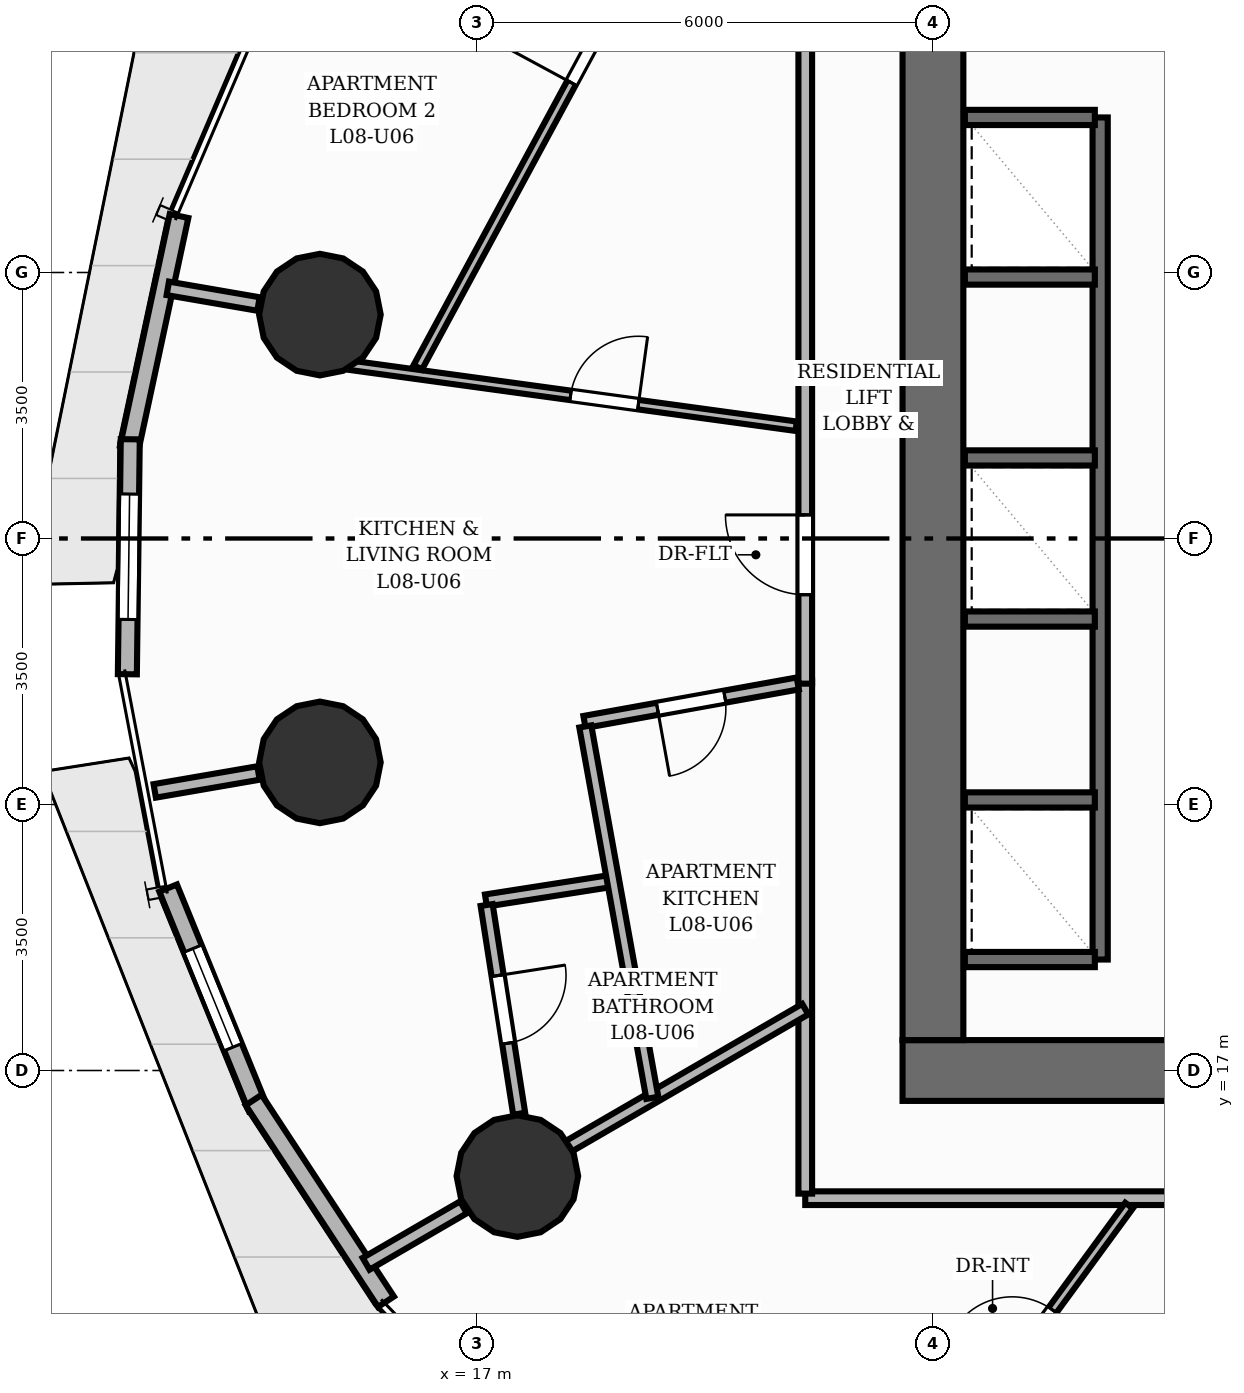
"""IFC4 building model, lengths in metres.
Left out: names, types, materials, properties, quantities, classifications, styles, units other than length and angle.
Written with IfcOpenShell. Run it as: python <this file> out.ifc"""

import sys

from ifc_helpers import new_model, si_unit, direction, frame, frame_2d, origin, origin_2d, place, context, subcontext, project, spatial, rectangle, circle, extrude, element, fill, save


model = new_model("IFC4")
c1 = context("Model", 3, precision=1e-05, world=origin(), true_north=direction((0.0, 1.0)))
c2 = subcontext(c1, "Body", "Model", "MODEL_VIEW")
j1 = project(units=[si_unit("LENGTHUNIT", "METRE"), si_unit("PLANEANGLEUNIT", "RADIAN")], contexts=[c1])
p1 = place(None, origin())
s1 = spatial("IfcSite", under=j1, at=p1, CompositionType="ELEMENT")
p2 = place(p1, origin())
s2 = spatial("IfcBuilding", under=s1, at=p2, CompositionType="ELEMENT")
p3 = place(p2, frame((0.0, 0.0, 31.2)))
s3 = spatial("IfcBuildingStorey", under=s2, at=p3, CompositionType="ELEMENT", Elevation=31.2)
p4 = place(p3, frame((22.6, 17.0, 0.0), z_axis=(0.0, 0.0, 1.0), x_axis=(1.0, 0.0, 0.0)))
e1 = element("IfcWall", 1, at=p4, inside=s3, PredefinedType="SHEAR", context=c2, shape_type="SweptSolid", body=[
    extrude(rectangle(XDim=18.8, YDim=0.8, at=frame_2d((9.4, 0.0))), origin(), (0.0, 0.0, 1.0), 3.2),
])
p5 = place(p4, frame((5.9, 0.0, 0.0)))
e2 = element("IfcOpeningElement", 2, at=p5, cuts=e1, PredefinedType="OPENING", context=c2, shape_type="SweptSolid", body=[
    extrude(rectangle(XDim=1.1, YDim=2.15, at=frame_2d((0.55, 1.075))), frame((0.0, 0.41, 0.0), z_axis=(0.0, -1.0, 0.0), x_axis=(1.0, 0.0, 0.0)), (0.0, 0.0, 1.0), 0.82),
])
p6 = place(p4, frame((9.45, 0.0, 0.0)))
e3 = element("IfcOpeningElement", 3, at=p6, cuts=e1, PredefinedType="OPENING", context=c2, shape_type="SweptSolid", body=[
    extrude(rectangle(XDim=0.9, YDim=2.1, at=frame_2d((0.45, 1.05))), frame((0.0, 0.41, 0.0), z_axis=(0.0, -1.0, 0.0), x_axis=(1.0, 0.0, 0.0)), (0.0, 0.0, 1.0), 0.82),
])
p7 = place(p3, frame((23.0, 17.4, 0.0), z_axis=(0.0, 0.0, 1.0), x_axis=(0.0, 1.0, 0.0)))
e4 = element("IfcWall", 4, at=p7, inside=s3, PredefinedType="SHEAR", context=c2, shape_type="SweptSolid", body=[
    extrude(rectangle(XDim=13.2, YDim=0.8, at=frame_2d((6.6, 0.0))), origin(), (0.0, 0.0, 1.0), 3.2),
])
for number, where, z_axis, x_axis in (
    (5, (14.934, 26.946, 0.0), (0.0, 0.0, 1.0), (1.0, 0.0, 0.0)),
    (6, (14.934, 21.054, 0.0), (0.0, 0.0, 1.0), (1.0, 0.0, 0.0)),
    (7, (17.532, 15.611, 0.0), (0.0, 0.0, 1.0), (1.0, 0.0, 0.0)),
):
    element("IfcColumn", number, at=place(p3, frame(where, z_axis=z_axis, x_axis=x_axis)), inside=s3, PredefinedType="COLUMN", context=c2, shape_type="SweptSolid", body=[
        extrude(circle(Radius=0.8, at=origin_2d()), origin(), (0.0, 0.0, 1.0), 3.2),
    ])
p8 = place(p3, frame((12.427, 25.192, 0.0), z_axis=(0.0, 0.0, 1.0), x_axis=(0.209668000253, 0.977772637002, 0.0)))
e8 = element("IfcWall", 8, at=p8, inside=s3, PredefinedType="SOLIDWALL", context=c2, shape_type="SweptSolid", body=[
    extrude(rectangle(XDim=3.121, YDim=0.25, at=frame_2d((1.56, 0.0))), origin(), (0.0, 0.0, 1.0), 2.96),
])
p9 = place(p3, frame((12.401, 22.214, 0.0), z_axis=(0.0, 0.0, 1.0), x_axis=(0.012397373015, 0.999923149618, 0.0)))
e9 = element("IfcWall", 9, at=p9, inside=s3, PredefinedType="SOLIDWALL", context=c2, shape_type="SweptSolid", body=[
    extrude(rectangle(XDim=3.092, YDim=0.25, at=frame_2d((1.546, 0.0))), origin(), (0.0, 0.0, 1.0), 2.96),
])
p10 = place(p9, frame((0.721, 0.0, 0.85)))
e10 = element("IfcOpeningElement", 10, at=p10, cuts=e9, PredefinedType="OPENING", context=c2, shape_type="SweptSolid", body=[
    extrude(rectangle(XDim=1.65, YDim=1.55, at=frame_2d((0.825, 0.775))), frame((0.0, 0.135, 0.0), z_axis=(0.0, -1.0, 0.0), x_axis=(1.0, 0.0, 0.0)), (0.0, 0.0, 1.0), 0.27),
])
p11 = place(p3, frame((14.115, 16.511, 0.0), z_axis=(0.0, 0.0, 1.0), x_axis=(-0.377493207518, 0.926012353199, 0.0)))
e11 = element("IfcWall", 11, at=p11, inside=s3, PredefinedType="SOLIDWALL", context=c2, shape_type="SweptSolid", body=[
    extrude(rectangle(XDim=3.121, YDim=0.25, at=frame_2d((1.56, 0.0))), origin(), (0.0, 0.0, 1.0), 2.96),
])
p12 = place(p11, frame((0.86, 0.0, 0.85)))
e12 = element("IfcOpeningElement", 12, at=p12, cuts=e11, PredefinedType="OPENING", context=c2, shape_type="SweptSolid", body=[
    extrude(rectangle(XDim=1.4, YDim=1.55, at=frame_2d((0.7, 0.775))), frame((0.0, 0.135, 0.0), z_axis=(0.0, -1.0, 0.0), x_axis=(1.0, 0.0, 0.0)), (0.0, 0.0, 1.0), 0.27),
])
p13 = place(p3, frame((15.804, 13.958, 0.0), z_axis=(0.0, 0.0, 1.0), x_axis=(-0.548579153619, 0.836098625889, 0.0)))
e13 = element("IfcWall", 13, at=p13, inside=s3, PredefinedType="SOLIDWALL", context=c2, shape_type="SweptSolid", body=[
    extrude(rectangle(XDim=3.174, YDim=0.25, at=frame_2d((1.587, 0.0))), origin(), (0.0, 0.0, 1.0), 2.96),
])
p14 = place(p3, frame((25.2, 18.46, 0.0), z_axis=(0.0, 0.0, 1.0), x_axis=(0.0, 1.0, 0.0)))
e14 = element("IfcWall", 14, at=p14, inside=s3, PredefinedType="SHEAR", context=c2, shape_type="SweptSolid", body=[
    extrude(rectangle(XDim=11.08, YDim=0.2, at=frame_2d((5.54, 0.0))), origin(), (0.0, 0.0, 1.0), 3.2),
])
for number, where, z_axis, x_axis in (
    (15, (23.42, 18.46, 0.0), (0.0, 0.0, 1.0), (1.0, 0.0, 0.0)),
    (16, (23.42, 29.54, 0.0), (0.0, 0.0, 1.0), (1.0, 0.0, 0.0)),
    (17, (23.42, 20.56, 0.0), (0.0, 0.0, 1.0), (1.0, 0.0, 0.0)),
    (18, (23.42, 22.94, 0.0), (0.0, 0.0, 1.0), (1.0, 0.0, 0.0)),
    (19, (23.42, 25.06, 0.0), (0.0, 0.0, 1.0), (1.0, 0.0, 0.0)),
    (20, (23.42, 27.44, 0.0), (0.0, 0.0, 1.0), (1.0, 0.0, 0.0)),
):
    element("IfcWall", number, at=place(p3, frame(where, z_axis=z_axis, x_axis=x_axis)), inside=s3, PredefinedType="SHEAR", context=c2, shape_type="SweptSolid", body=[
        extrude(rectangle(XDim=1.71, YDim=0.2, at=frame_2d((0.855, 0.0))), origin(), (0.0, 0.0, 1.0), 3.2),
    ])
p15 = place(p3, frame((14.126, 27.085, 0.0), z_axis=(0.0, 0.0, 1.0), x_axis=(-0.985412344637, 0.170183756676, 0.0)))
e21 = element("IfcWall", 21, at=p15, inside=s3, PredefinedType="PARTITIONING", context=c2, shape_type="SweptSolid", body=[
    extrude(rectangle(XDim=1.211, YDim=0.18, at=frame_2d((0.605, 0.0))), origin(), (0.0, 0.0, 1.0), 2.178),
])
p16 = place(p3, frame((14.126, 20.915, 0.0), z_axis=(0.0, 0.0, 1.0), x_axis=(-0.985429571056, -0.170083980696, 0.0)))
e22 = element("IfcWall", 22, at=p16, inside=s3, PredefinedType="PARTITIONING", context=c2, shape_type="SweptSolid", body=[
    extrude(rectangle(XDim=1.385, YDim=0.18, at=frame_2d((0.693, 0.0))), origin(), (0.0, 0.0, 1.0), 2.178),
])
p17 = place(p3, frame((16.823, 15.2, 0.0), z_axis=(0.0, 0.0, 1.0), x_axis=(-0.865049792178, -0.501686014408, 0.0)))
e23 = element("IfcWall", 23, at=p17, inside=s3, PredefinedType="PARTITIONING", context=c2, shape_type="SweptSolid", body=[
    extrude(rectangle(XDim=1.481, YDim=0.18, at=frame_2d((0.74, 0.0))), origin(), (0.0, 0.0, 1.0), 2.178),
])
p18 = place(p3, frame((33.898, 15.32, 0.0), z_axis=(0.0, 0.0, 1.0), x_axis=(-1.0, 0.0, 0.0)))
e24 = element("IfcWall", 24, at=p18, inside=s3, PredefinedType="PARTITIONING", context=c2, shape_type="SweptSolid", body=[
    extrude(rectangle(XDim=12.578, YDim=0.18, at=frame_2d((6.289, 0.0))), origin(), (0.0, 0.0, 1.0), 2.955),
])
p19 = place(p18, frame((5.833, 0.0, 0.0)))
e25 = element("IfcOpeningElement", 25, at=p19, cuts=e24, PredefinedType="OPENING", context=c2, shape_type="SweptSolid", body=[
    extrude(rectangle(XDim=1.05, YDim=2.15, at=frame_2d((0.525, 1.075))), frame((0.0, 0.1, 0.0), z_axis=(0.0, -1.0, 0.0), x_axis=(1.0, 0.0, 0.0)), (0.0, 0.0, 1.0), 0.2),
])
p20 = place(p3, frame((21.32, 15.38, 0.0), z_axis=(0.0, 0.0, 1.0), x_axis=(0.0, 1.0, 0.0)))
e26 = element("IfcWall", 26, at=p20, inside=s3, PredefinedType="PARTITIONING", context=c2, shape_type="SweptSolid", body=[
    extrude(rectangle(XDim=6.749, YDim=0.18, at=frame_2d((3.374, 0.0))), origin(), (0.0, 0.0, 1.0), 2.955),
])
p21 = place(p3, frame((21.32, 22.09, 0.0), z_axis=(0.0, 0.0, 1.0), x_axis=(0.0, 1.0, 0.0)))
e27 = element("IfcWall", 27, at=p21, inside=s3, PredefinedType="PARTITIONING", context=c2, shape_type="SweptSolid", body=[
    extrude(rectangle(XDim=10.59, YDim=0.18, at=frame_2d((5.295, 0.0))), origin(), (0.0, 0.0, 1.0), 2.955),
])
p22 = place(p21, frame((1.17, 0.0, 0.0)))
e28 = element("IfcOpeningElement", 28, at=p22, cuts=e27, PredefinedType="OPENING", context=c2, shape_type="SweptSolid", body=[
    extrude(rectangle(XDim=1.05, YDim=2.15, at=frame_2d((0.525, 1.075))), frame((0.0, 0.1, 0.0), z_axis=(0.0, -1.0, 0.0), x_axis=(1.0, 0.0, 0.0)), (0.0, 0.0, 1.0), 0.2),
])
p23 = place(p3, frame((29.39, 15.229, 0.0), z_axis=(0.0, 0.0, 1.0), x_axis=(-0.421930101453, -0.906628363492, 0.0)))
e29 = element("IfcWall", 29, at=p23, inside=s3, PredefinedType="PLUMBINGWALL", context=c2, shape_type="SweptSolid", body=[
    extrude(rectangle(XDim=8.312, YDim=0.16, at=frame_2d((4.156, 0.0))), origin(), (0.0, 0.0, 1.0), 2.955),
])
p24 = place(p23, frame((3.706, 0.0, 0.0)))
e30 = element("IfcOpeningElement", 30, at=p24, cuts=e29, PredefinedType="OPENING", context=c2, shape_type="SweptSolid", body=[
    extrude(rectangle(XDim=0.9, YDim=2.1, at=frame_2d((0.45, 1.05))), frame((0.0, 0.09, 0.0), z_axis=(0.0, -1.0, 0.0), x_axis=(1.0, 0.0, 0.0)), (0.0, 0.0, 1.0), 0.18),
])
p25 = place(p3, frame((23.038, 11.747, 0.0), z_axis=(0.0, 0.0, 1.0), x_axis=(0.590387510638, 0.807119933642, 0.0)))
e31 = element("IfcWall", 31, at=p25, inside=s3, PredefinedType="PARTITIONING", context=c2, shape_type="SweptSolid", body=[
    extrude(rectangle(XDim=4.306, YDim=0.125, at=frame_2d((2.153, 0.0))), origin(), (0.0, 0.0, 1.0), 2.178),
])
p26 = place(p25, frame((1.703, 0.0, 0.0)))
e32 = element("IfcOpeningElement", 32, at=p26, cuts=e31, PredefinedType="OPENING", context=c2, shape_type="SweptSolid", body=[
    extrude(rectangle(XDim=0.9, YDim=2.1, at=frame_2d((0.45, 1.05))), frame((0.0, 0.073, 0.0), z_axis=(0.0, -1.0, 0.0), x_axis=(1.0, 0.0, 0.0)), (0.0, 0.0, 1.0), 0.145),
])
p27 = place(p3, frame((18.202, 15.999, 0.0), z_axis=(0.0, 0.0, 1.0), x_axis=(0.865099964078, 0.501599493773, 0.0)))
e33 = element("IfcWall", 33, at=p27, inside=s3, PredefinedType="PLUMBINGWALL", context=c2, shape_type="SweptSolid", body=[
    extrude(rectangle(XDim=3.605, YDim=0.16, at=frame_2d((1.802, 0.0))), origin(), (0.0, 0.0, 1.0), 2.178),
])
p28 = place(p3, frame((18.792, 19.498, 0.0), z_axis=(0.0, 0.0, 1.0), x_axis=(-0.988061441457, -0.154060338524, 0.0)))
e34 = element("IfcWall", 34, at=p28, inside=s3, PredefinedType="PLUMBINGWALL", context=c2, shape_type="SweptSolid", body=[
    extrude(rectangle(XDim=1.694, YDim=0.16, at=frame_2d((0.847, 0.0))), origin(), (0.0, 0.0, 1.0), 2.955),
])
p29 = place(p3, frame((17.128, 19.177, 0.0), z_axis=(0.0, 0.0, 1.0), x_axis=(0.154135750111, -0.988049680197, 0.0)))
e35 = element("IfcWall", 35, at=p29, inside=s3, PredefinedType="PLUMBINGWALL", context=c2, shape_type="SweptSolid", body=[
    extrude(rectangle(XDim=2.78, YDim=0.16, at=frame_2d((1.39, 0.0))), origin(), (0.0, 0.0, 1.0), 2.955),
])
p30 = place(p29, frame((0.94, 0.0, 0.0)))
e36 = element("IfcOpeningElement", 36, at=p30, cuts=e35, PredefinedType="OPENING", context=c2, shape_type="SweptSolid", body=[
    extrude(rectangle(XDim=0.9, YDim=2.1, at=frame_2d((0.45, 1.05))), frame((0.0, 0.09, 0.0), z_axis=(0.0, -1.0, 0.0), x_axis=(1.0, 0.0, 0.0)), (0.0, 0.0, 1.0), 0.18),
])
p31 = place(p3, frame((15.33, 26.28, 0.0), z_axis=(0.0, 0.0, 1.0), x_axis=(0.990775681502, -0.135512172681, 0.0)))
e37 = element("IfcWall", 37, at=p31, inside=s3, PredefinedType="PARTITIONING", context=c2, shape_type="SweptSolid", body=[
    extrude(rectangle(XDim=5.926, YDim=0.125, at=frame_2d((2.963, 0.0))), origin(), (0.0, 0.0, 1.0), 2.955),
])
p32 = place(p31, frame((2.929, 0.0, 0.0)))
e38 = element("IfcOpeningElement", 38, at=p32, cuts=e37, PredefinedType="OPENING", context=c2, shape_type="SweptSolid", body=[
    extrude(rectangle(XDim=0.9, YDim=2.1, at=frame_2d((0.45, 1.05))), frame((0.0, 0.073, 0.0), z_axis=(0.0, -1.0, 0.0), x_axis=(1.0, 0.0, 0.0)), (0.0, 0.0, 1.0), 0.145),
])
p33 = place(p3, frame((21.222, 22.093, 0.0), z_axis=(0.0, 0.0, 1.0), x_axis=(-0.984110100035, -0.177559316875, 0.0)))
e39 = element("IfcWall", 39, at=p33, inside=s3, PredefinedType="PLUMBINGWALL", context=c2, shape_type="SweptSolid", body=[
    extrude(rectangle(XDim=2.852, YDim=0.16, at=frame_2d((1.426, 0.0))), origin(), (0.0, 0.0, 1.0), 2.178),
])
p34 = place(p33, frame((0.976, 0.0, 0.0)))
e40 = element("IfcOpeningElement", 40, at=p34, cuts=e39, PredefinedType="OPENING", context=c2, shape_type="SweptSolid", body=[
    extrude(rectangle(XDim=0.9, YDim=2.1, at=frame_2d((0.45, 1.05))), frame((0.0, 0.09, 0.0), z_axis=(0.0, -1.0, 0.0), x_axis=(1.0, 0.0, 0.0)), (0.0, 0.0, 1.0), 0.18),
])
p35 = place(p3, frame((18.426, 21.527, 0.0), z_axis=(0.0, 0.0, 1.0), x_axis=(0.177634916986, -0.98409645679, 0.0)))
e41 = element("IfcWall", 41, at=p35, inside=s3, PredefinedType="PLUMBINGWALL", context=c2, shape_type="SweptSolid", body=[
    extrude(rectangle(XDim=4.966, YDim=0.16, at=frame_2d((2.483, 0.0))), origin(), (0.0, 0.0, 1.0), 2.955),
])
p36 = place(p3, frame((16.222, 26.252, 0.0), z_axis=(0.0, 0.0, 1.0), x_axis=(0.475374660533, 0.879783457519, 0.0)))
e42 = element("IfcWall", 42, at=p36, inside=s3, PredefinedType="PARTITIONING", context=c2, shape_type="SweptSolid", body=[
    extrude(rectangle(XDim=11.37, YDim=0.125, at=frame_2d((5.685, 0.0))), origin(), (0.0, 0.0, 1.0), 2.328),
])
p37 = place(p36, frame((4.255, 0.0, 0.0)))
e43 = element("IfcOpeningElement", 43, at=p37, cuts=e42, PredefinedType="OPENING", context=c2, shape_type="SweptSolid", body=[
    extrude(rectangle(XDim=0.9, YDim=2.1, at=frame_2d((0.45, 1.05))), frame((0.0, 0.073, 0.0), z_axis=(0.0, -1.0, 0.0), x_axis=(1.0, 0.0, 0.0)), (0.0, 0.0, 1.0), 0.145),
])
p38 = place(p10, origin())
e44 = element("IfcWindow", 44, at=p38, inside=s3, PartitioningType="SINGLE_PANEL", PredefinedType="WINDOW", context=c2, shape_type="SweptSolid", body=[
    extrude(rectangle(XDim=1.65, YDim=1.55, at=frame_2d((0.825, 0.775))), frame((0.0, 0.03, 0.0), z_axis=(0.0, -1.0, 0.0), x_axis=(1.0, 0.0, 0.0)), (0.0, 0.0, 1.0), 0.06),
])
fill(e10, e44)
p39 = place(p12, origin())
e45 = element("IfcWindow", 45, at=p39, inside=s3, PartitioningType="SINGLE_PANEL", PredefinedType="WINDOW", context=c2, shape_type="SweptSolid", body=[
    extrude(rectangle(XDim=1.4, YDim=1.55, at=frame_2d((0.7, 0.775))), frame((0.0, 0.03, 0.0), z_axis=(0.0, -1.0, 0.0), x_axis=(1.0, 0.0, 0.0)), (0.0, 0.0, 1.0), 0.06),
])
fill(e12, e45)
p40 = place(p26, origin())
e46 = element("IfcDoor", 46, at=p40, inside=s3, OperationType="SINGLE_SWING_LEFT", PredefinedType="DOOR", context=c2, shape_type="SweptSolid", body=[
    extrude(rectangle(XDim=0.9, YDim=2.1, at=frame_2d((0.45, 1.05))), frame((0.0, 0.025, 0.0), z_axis=(0.0, -1.0, 0.0), x_axis=(1.0, 0.0, 0.0)), (0.0, 0.0, 1.0), 0.05),
])
fill(e32, e46)
p41 = place(p22, origin())
e47 = element("IfcDoor", 47, at=p41, inside=s3, OperationType="SINGLE_SWING_RIGHT", PredefinedType="DOOR", context=c2, shape_type="SweptSolid", body=[
    extrude(rectangle(XDim=1.05, YDim=2.15, at=frame_2d((0.525, 1.075))), frame((0.0, 0.025, 0.0), z_axis=(0.0, -1.0, 0.0), x_axis=(1.0, 0.0, 0.0)), (0.0, 0.0, 1.0), 0.05),
])
fill(e28, e47)
p42 = place(p30, origin())
e48 = element("IfcDoor", 48, at=p42, inside=s3, OperationType="SINGLE_SWING_LEFT", PredefinedType="DOOR", context=c2, shape_type="SweptSolid", body=[
    extrude(rectangle(XDim=0.9, YDim=2.1, at=frame_2d((0.45, 1.05))), frame((0.0, 0.025, 0.0), z_axis=(0.0, -1.0, 0.0), x_axis=(1.0, 0.0, 0.0)), (0.0, 0.0, 1.0), 0.05),
])
fill(e36, e48)
p43 = place(p32, origin())
e49 = element("IfcDoor", 49, at=p43, inside=s3, OperationType="SINGLE_SWING_RIGHT", PredefinedType="DOOR", context=c2, shape_type="SweptSolid", body=[
    extrude(rectangle(XDim=0.9, YDim=2.1, at=frame_2d((0.45, 1.05))), frame((0.0, 0.025, 0.0), z_axis=(0.0, -1.0, 0.0), x_axis=(1.0, 0.0, 0.0)), (0.0, 0.0, 1.0), 0.05),
])
fill(e38, e49)
p44 = place(p37, origin())
e50 = element("IfcDoor", 50, at=p44, inside=s3, OperationType="SINGLE_SWING_LEFT", PredefinedType="DOOR", context=c2, shape_type="SweptSolid", body=[
    extrude(rectangle(XDim=0.9, YDim=2.1, at=frame_2d((0.45, 1.05))), frame((0.0, 0.025, 0.0), z_axis=(0.0, -1.0, 0.0), x_axis=(1.0, 0.0, 0.0)), (0.0, 0.0, 1.0), 0.05),
])
fill(e43, e50)
p45 = place(p34, origin())
e51 = element("IfcDoor", 51, at=p45, inside=s3, OperationType="SINGLE_SWING_RIGHT", PredefinedType="DOOR", context=c2, shape_type="SweptSolid", body=[
    extrude(rectangle(XDim=0.9, YDim=2.1, at=frame_2d((0.45, 1.05))), frame((0.0, 0.025, 0.0), z_axis=(0.0, -1.0, 0.0), x_axis=(1.0, 0.0, 0.0)), (0.0, 0.0, 1.0), 0.05),
])
fill(e40, e51)
save(model, sys.argv[1])
